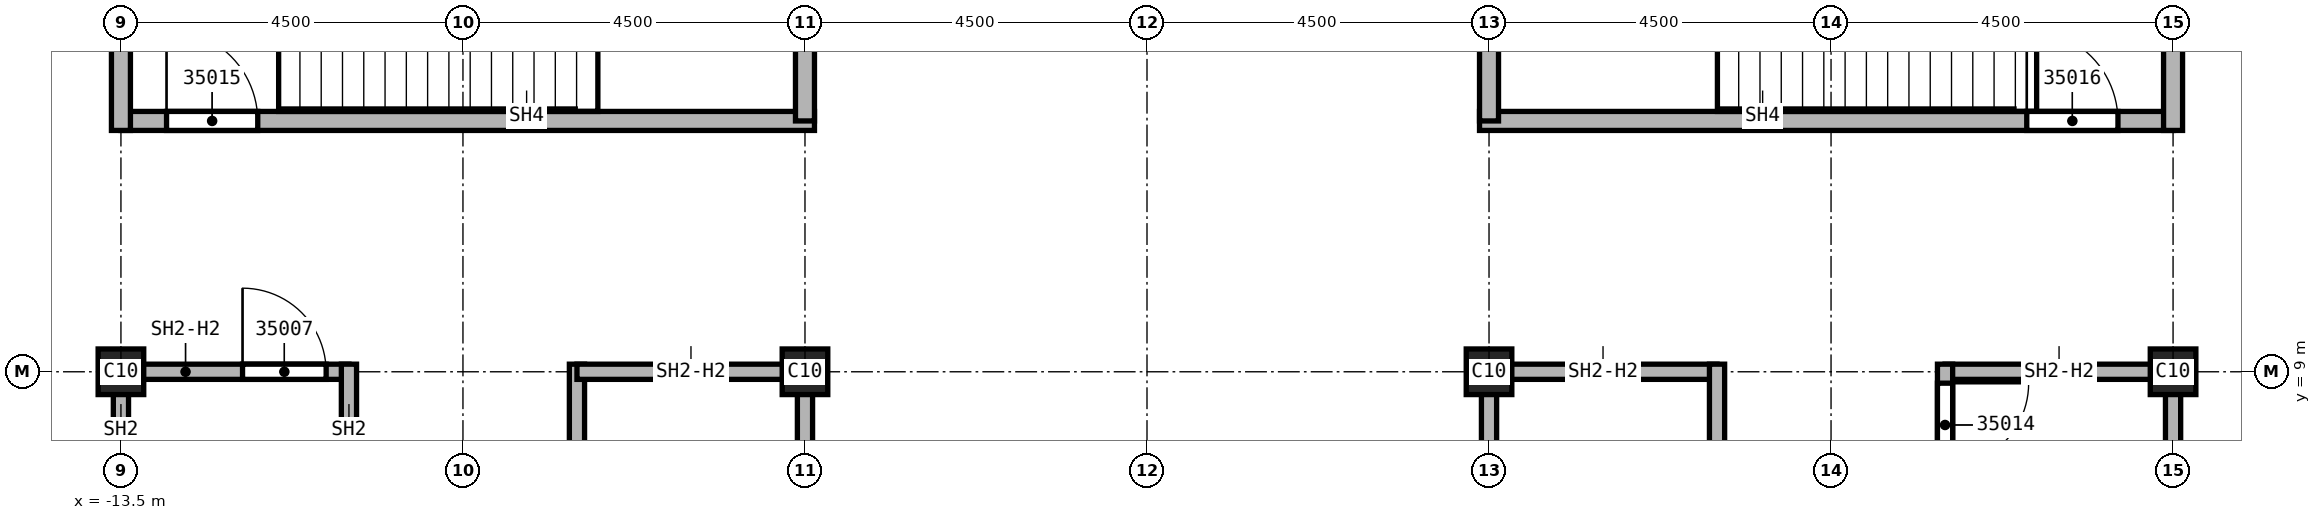
"""IFC4 building model, lengths in metres.
Left out: names, types, materials, properties, quantities, classifications, styles, units other than length and angle.
Written with IfcOpenShell. Run it as: python <this file> out.ifc"""

import sys

from ifc_helpers import new_model, si_unit, direction, frame, frame_2d, origin, origin_2d, place, context, subcontext, project, spatial, rectangle, extrude, element, fill, save


model = new_model("IFC4")
c1 = context("Model", 3, precision=1e-05, world=origin(), true_north=direction((0.0, 1.0)))
c2 = subcontext(c1, "Body", "Model", "MODEL_VIEW")
j1 = project(units=[si_unit("LENGTHUNIT", "METRE"), si_unit("PLANEANGLEUNIT", "RADIAN")], contexts=[c1])
p1 = place(None, origin())
s1 = spatial("IfcSite", under=j1, at=p1, CompositionType="ELEMENT")
p2 = place(p1, origin())
s2 = spatial("IfcBuilding", under=s1, at=p2, CompositionType="ELEMENT")
p3 = place(p2, frame((0.0, 0.0, 376.0)))
s3 = spatial("IfcBuildingStorey", under=s2, at=p3, CompositionType="ELEMENT", Elevation=376.0)
for number, where, z_axis, x_axis in (
    (1, (4.5, 9.0, 0.0), (0.0, 0.0, 1.0), (1.0, 0.0, 0.0)),
    (2, (13.5, 9.0, 0.0), (0.0, 0.0, 1.0), (1.0, 0.0, 0.0)),
    (3, (-4.5, 9.0, 0.0), (0.0, 0.0, 1.0), (1.0, 0.0, 0.0)),
    (4, (-13.5, 9.0, 0.0), (0.0, 0.0, 1.0), (1.0, 0.0, 0.0)),
):
    element("IfcColumn", number, at=place(p3, frame(where, z_axis=z_axis, x_axis=x_axis)), inside=s3, PredefinedType="COLUMN", context=c2, shape_type="SweptSolid", body=[
        extrude(rectangle(XDim=0.6, YDim=0.6, at=origin_2d()), origin(), (0.0, 0.0, 1.0), 4.6),
    ])
p4 = place(p3, frame((-13.5, 7.5, 0.0), z_axis=(0.0, 0.0, 1.0), x_axis=(0.0, 1.0, 0.0)))
e5 = element("IfcWall", 5, at=p4, inside=s3, PredefinedType="SOLIDWALL", context=c2, shape_type="SweptSolid", body=[
    extrude(rectangle(XDim=1.6, YDim=0.2, at=frame_2d((0.8, 0.0))), origin(), (0.0, 0.0, 1.0), 4.15),
])
p5 = place(p3, frame((-13.5, 9.0, 0.0), z_axis=(0.0, 0.0, 1.0), x_axis=(1.0, 0.0, 0.0)))
e6 = element("IfcWall", 6, at=p5, inside=s3, PredefinedType="SOLIDWALL", context=c2, shape_type="SweptSolid", body=[
    extrude(rectangle(XDim=3.0, YDim=0.2, at=frame_2d((1.5, 0.0))), origin(), (0.0, 0.0, 1.0), 3.754),
])
p6 = place(p5, frame((1.6, 0.0, 0.0)))
e7 = element("IfcOpeningElement", 7, at=p6, cuts=e6, PredefinedType="OPENING", context=c2, shape_type="SweptSolid", body=[
    extrude(rectangle(XDim=1.1, YDim=2.1, at=frame_2d((0.55, 1.05))), frame((0.0, 0.1, 0.0), z_axis=(0.0, -1.0, 0.0), x_axis=(1.0, 0.0, 0.0)), (0.0, 0.0, 1.0), 0.2),
])
p7 = place(p3, frame((-10.5, 7.425, 0.0), z_axis=(0.0, 0.0, 1.0), x_axis=(0.0, 1.0, 0.0)))
e8 = element("IfcWall", 8, at=p7, inside=s3, PredefinedType="SOLIDWALL", context=c2, shape_type="SweptSolid", body=[
    extrude(rectangle(XDim=1.675, YDim=0.2, at=frame_2d((0.837, 0.0))), origin(), (0.0, 0.0, 1.0), 4.15),
])
p8 = place(p3, frame((-7.5, 2.875, 0.0), z_axis=(0.0, 0.0, 1.0), x_axis=(0.0, 1.0, 0.0)))
e9 = element("IfcWall", 9, at=p8, inside=s3, PredefinedType="SOLIDWALL", context=c2, shape_type="SweptSolid", body=[
    extrude(rectangle(XDim=6.225, YDim=0.2, at=frame_2d((3.113, 0.0))), origin(), (0.0, 0.0, 1.0), 4.15),
])
p9 = place(p3, frame((-7.5, 9.0, 0.0), z_axis=(0.0, 0.0, 1.0), x_axis=(1.0, 0.0, 0.0)))
e10 = element("IfcWall", 10, at=p9, inside=s3, PredefinedType="SOLIDWALL", context=c2, shape_type="SweptSolid", body=[
    extrude(rectangle(XDim=3.0, YDim=0.2, at=frame_2d((1.5, 0.0))), origin(), (0.0, 0.0, 1.0), 3.754),
])
p10 = place(p3, frame((-4.5, 9.1, 0.0), z_axis=(0.0, 0.0, 1.0), x_axis=(0.0, -1.0, 0.0)))
e11 = element("IfcWall", 11, at=p10, inside=s3, PredefinedType="SOLIDWALL", context=c2, shape_type="SweptSolid", body=[
    extrude(rectangle(XDim=17.65, YDim=0.2, at=frame_2d((8.825, 0.0))), origin(), (0.0, 0.0, 1.0), 3.722),
])
p11 = place(p10, frame((12.35, 0.0, 0.0)))
e12 = element("IfcOpeningElement", 12, at=p11, cuts=e11, PredefinedType="OPENING", context=c2, shape_type="SweptSolid", body=[
    extrude(rectangle(XDim=1.1, YDim=2.1, at=frame_2d((0.55, 1.05))), frame((0.0, 0.1, 0.0), z_axis=(0.0, -1.0, 0.0), x_axis=(1.0, 0.0, 0.0)), (0.0, 0.0, 1.0), 0.2),
])
p12 = place(p10, frame((7.15, 0.0, 0.0)))
e13 = element("IfcOpeningElement", 13, at=p12, cuts=e11, PredefinedType="OPENING", context=c2, shape_type="SweptSolid", body=[
    extrude(rectangle(XDim=1.1, YDim=2.1, at=frame_2d((0.55, 1.05))), frame((0.0, 0.1, 0.0), z_axis=(0.0, -1.0, 0.0), x_axis=(1.0, 0.0, 0.0)), (0.0, 0.0, 1.0), 0.2),
])
p13 = place(p3, frame((4.5, -8.55, 0.0), z_axis=(0.0, 0.0, 1.0), x_axis=(0.0, 1.0, 0.0)))
e14 = element("IfcWall", 14, at=p13, inside=s3, PredefinedType="SOLIDWALL", context=c2, shape_type="SweptSolid", body=[
    extrude(rectangle(XDim=17.65, YDim=0.2, at=frame_2d((8.825, 0.0))), origin(), (0.0, 0.0, 1.0), 3.722),
])
p14 = place(p13, frame((3.1, 0.0, 0.0)))
e15 = element("IfcOpeningElement", 15, at=p14, cuts=e14, PredefinedType="OPENING", context=c2, shape_type="SweptSolid", body=[
    extrude(rectangle(XDim=1.1, YDim=2.1, at=frame_2d((0.55, 1.05))), frame((0.0, 0.1, 0.0), z_axis=(0.0, -1.0, 0.0), x_axis=(1.0, 0.0, 0.0)), (0.0, 0.0, 1.0), 0.2),
])
p15 = place(p13, frame((11.05, 0.0, 0.0)))
e16 = element("IfcOpeningElement", 16, at=p15, cuts=e14, PredefinedType="OPENING", context=c2, shape_type="SweptSolid", body=[
    extrude(rectangle(XDim=1.1, YDim=2.1, at=frame_2d((0.55, 1.05))), frame((0.0, 0.1, 0.0), z_axis=(0.0, -1.0, 0.0), x_axis=(1.0, 0.0, 0.0)), (0.0, 0.0, 1.0), 0.2),
])
p16 = place(p3, frame((4.5, 9.0, 0.0), z_axis=(0.0, 0.0, 1.0), x_axis=(1.0, 0.0, 0.0)))
e17 = element("IfcWall", 17, at=p16, inside=s3, PredefinedType="SOLIDWALL", context=c2, shape_type="SweptSolid", body=[
    extrude(rectangle(XDim=3.0, YDim=0.2, at=frame_2d((1.5, 0.0))), origin(), (0.0, 0.0, 1.0), 3.754),
])
p17 = place(p3, frame((7.5, 9.1, 0.0), z_axis=(0.0, 0.0, 1.0), x_axis=(0.0, -1.0, 0.0)))
e18 = element("IfcWall", 18, at=p17, inside=s3, PredefinedType="SOLIDWALL", context=c2, shape_type="SweptSolid", body=[
    extrude(rectangle(XDim=6.225, YDim=0.2, at=frame_2d((3.113, 0.0))), origin(), (0.0, 0.0, 1.0), 4.15),
])
p18 = place(p3, frame((10.5, 9.0, 0.0), z_axis=(0.0, 0.0, 1.0), x_axis=(1.0, 0.0, 0.0)))
e19 = element("IfcWall", 19, at=p18, inside=s3, PredefinedType="SOLIDWALL", context=c2, shape_type="SweptSolid", body=[
    extrude(rectangle(XDim=3.0, YDim=0.2, at=frame_2d((1.5, 0.0))), origin(), (0.0, 0.0, 1.0), 3.754),
])
p19 = place(p3, frame((10.5, 9.1, 0.0), z_axis=(0.0, 0.0, 1.0), x_axis=(0.0, -1.0, 0.0)))
e20 = element("IfcWall", 20, at=p19, inside=s3, PredefinedType="SOLIDWALL", context=c2, shape_type="SweptSolid", body=[
    extrude(rectangle(XDim=3.225, YDim=0.2, at=frame_2d((1.613, 0.0))), origin(), (0.0, 0.0, 1.0), 4.15),
])
p20 = place(p19, frame((0.25, 0.0, 0.0)))
e21 = element("IfcOpeningElement", 21, at=p20, cuts=e20, PredefinedType="OPENING", context=c2, shape_type="SweptSolid", body=[
    extrude(rectangle(XDim=1.1, YDim=2.1, at=frame_2d((0.55, 1.05))), frame((0.0, 0.1, 0.0), z_axis=(0.0, -1.0, 0.0), x_axis=(1.0, 0.0, 0.0)), (0.0, 0.0, 1.0), 0.2),
])
p21 = place(p3, frame((13.5, 9.1, 0.0), z_axis=(0.0, 0.0, 1.0), x_axis=(0.0, -1.0, 0.0)))
e22 = element("IfcWall", 22, at=p21, inside=s3, PredefinedType="SOLIDWALL", context=c2, shape_type="SweptSolid", body=[
    extrude(rectangle(XDim=3.1, YDim=0.2, at=frame_2d((1.55, 0.0))), origin(), (0.0, 0.0, 1.0), 4.15),
])
p22 = place(p3, frame((-13.5, 12.3, 0.0), z_axis=(0.0, 0.0, 1.0), x_axis=(1.0, 0.0, 0.0)))
e23 = element("IfcWall", 23, at=p22, inside=s3, PredefinedType="SOLIDWALL", context=c2, shape_type="SweptSolid", body=[
    extrude(rectangle(XDim=9.125, YDim=0.25, at=frame_2d((4.562, 0.0))), origin(), (0.0, 0.0, 1.0), 4.15),
])
p23 = place(p22, frame((0.6, 0.0, 0.0)))
e24 = element("IfcOpeningElement", 24, at=p23, cuts=e23, PredefinedType="OPENING", context=c2, shape_type="SweptSolid", body=[
    extrude(rectangle(XDim=1.2, YDim=2.1, at=frame_2d((0.6, 1.05))), frame((0.0, 0.125, 0.0), z_axis=(0.0, -1.0, 0.0), x_axis=(1.0, 0.0, 0.0)), (0.0, 0.0, 1.0), 0.25),
])
p24 = place(p3, frame((-13.5, 12.175, 0.0), z_axis=(0.0, 0.0, 1.0), x_axis=(0.0, 1.0, 0.0)))
e25 = element("IfcWall", 25, at=p24, inside=s3, PredefinedType="SOLIDWALL", context=c2, shape_type="SweptSolid", body=[
    extrude(rectangle(XDim=4.75, YDim=0.25, at=frame_2d((2.375, 0.0))), origin(), (0.0, 0.0, 1.0), 4.15),
])
p25 = place(p3, frame((-4.5, 16.925, 0.0), z_axis=(0.0, 0.0, 1.0), x_axis=(0.0, -1.0, 0.0)))
e26 = element("IfcWall", 26, at=p25, inside=s3, PredefinedType="SOLIDWALL", context=c2, shape_type="SweptSolid", body=[
    extrude(rectangle(XDim=4.625, YDim=0.25, at=frame_2d((2.312, 0.0))), origin(), (0.0, 0.0, 1.0), 4.15),
])
p26 = place(p3, frame((4.375, 12.3, 0.0), z_axis=(0.0, 0.0, 1.0), x_axis=(1.0, 0.0, 0.0)))
e27 = element("IfcWall", 27, at=p26, inside=s3, PredefinedType="SOLIDWALL", context=c2, shape_type="SweptSolid", body=[
    extrude(rectangle(XDim=9.125, YDim=0.25, at=frame_2d((4.562, 0.0))), origin(), (0.0, 0.0, 1.0), 4.15),
])
p27 = place(p26, frame((7.2, 0.0, 0.0)))
e28 = element("IfcOpeningElement", 28, at=p27, cuts=e27, PredefinedType="OPENING", context=c2, shape_type="SweptSolid", body=[
    extrude(rectangle(XDim=1.2, YDim=2.1, at=frame_2d((0.6, 1.05))), frame((0.0, 0.125, 0.0), z_axis=(0.0, -1.0, 0.0), x_axis=(1.0, 0.0, 0.0)), (0.0, 0.0, 1.0), 0.25),
])
p28 = place(p3, frame((4.5, 12.3, 0.0), z_axis=(0.0, 0.0, 1.0), x_axis=(0.0, 1.0, 0.0)))
e29 = element("IfcWall", 29, at=p28, inside=s3, PredefinedType="SOLIDWALL", context=c2, shape_type="SweptSolid", body=[
    extrude(rectangle(XDim=4.625, YDim=0.25, at=frame_2d((2.312, 0.0))), origin(), (0.0, 0.0, 1.0), 4.15),
])
p29 = place(p3, frame((13.5, 12.175, 0.0), z_axis=(0.0, 0.0, 1.0), x_axis=(0.0, 1.0, 0.0)))
e30 = element("IfcWall", 30, at=p29, inside=s3, PredefinedType="SOLIDWALL", context=c2, shape_type="SweptSolid", body=[
    extrude(rectangle(XDim=4.75, YDim=0.25, at=frame_2d((2.375, 0.0))), origin(), (0.0, 0.0, 1.0), 4.15),
])
p30 = place(p6, origin())
e31 = element("IfcDoor", 31, at=p30, inside=s3, OperationType="SINGLE_SWING_RIGHT", PredefinedType="DOOR", context=c2, shape_type="SweptSolid", body=[
    extrude(rectangle(XDim=1.1, YDim=2.1, at=frame_2d((0.55, 1.05))), frame((0.0, 0.025, 0.0), z_axis=(0.0, -1.0, 0.0), x_axis=(1.0, 0.0, 0.0)), (0.0, 0.0, 1.0), 0.05),
])
fill(e7, e31)
p31 = place(p20, origin())
e32 = element("IfcDoor", 32, at=p31, inside=s3, OperationType="SINGLE_SWING_LEFT", PredefinedType="DOOR", context=c2, shape_type="SweptSolid", body=[
    extrude(rectangle(XDim=1.1, YDim=2.1, at=frame_2d((0.55, 1.05))), frame((0.0, 0.025, 0.0), z_axis=(0.0, -1.0, 0.0), x_axis=(1.0, 0.0, 0.0)), (0.0, 0.0, 1.0), 0.05),
])
fill(e21, e32)
p32 = place(p23, origin())
e33 = element("IfcDoor", 33, at=p32, inside=s3, OperationType="SINGLE_SWING_RIGHT", PredefinedType="DOOR", context=c2, shape_type="SweptSolid", body=[
    extrude(rectangle(XDim=1.2, YDim=2.1, at=frame_2d((0.6, 1.05))), frame((0.0, 0.025, 0.0), z_axis=(0.0, -1.0, 0.0), x_axis=(1.0, 0.0, 0.0)), (0.0, 0.0, 1.0), 0.05),
])
fill(e24, e33)
p33 = place(p27, origin())
e34 = element("IfcDoor", 34, at=p33, inside=s3, OperationType="SINGLE_SWING_LEFT", PredefinedType="DOOR", context=c2, shape_type="SweptSolid", body=[
    extrude(rectangle(XDim=1.2, YDim=2.1, at=frame_2d((0.6, 1.05))), frame((0.0, 0.025, 0.0), z_axis=(0.0, -1.0, 0.0), x_axis=(1.0, 0.0, 0.0)), (0.0, 0.0, 1.0), 0.05),
])
fill(e28, e34)
save(model, sys.argv[1])
